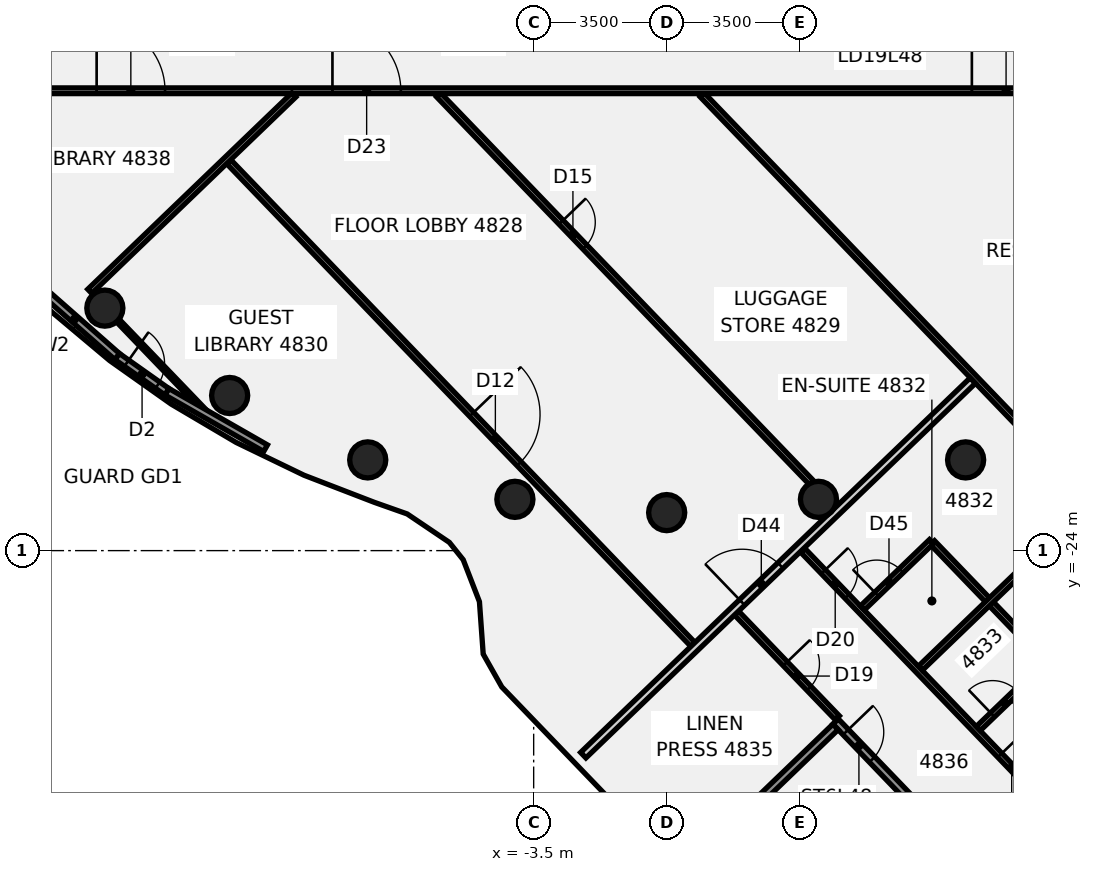
"""IFC4 building model, lengths in metres.
Left out: names, types, materials, properties, quantities, classifications, styles, units other than length and angle.
Written with IfcOpenShell. Run it as: python <this file> out.ifc"""

import sys

from ifc_helpers import new_model, si_unit, direction, frame, frame_2d, origin, origin_2d, place, context, subcontext, project, spatial, rectangle, circle, extrude, element, fill, save


model = new_model("IFC4")
c1 = context("Model", 3, precision=1e-05, world=origin(), true_north=direction((0.0, 1.0)))
c2 = subcontext(c1, "Body", "Model", "MODEL_VIEW")
j1 = project(units=[si_unit("LENGTHUNIT", "METRE"), si_unit("PLANEANGLEUNIT", "RADIAN")], contexts=[c1])
p1 = place(None, origin())
s1 = spatial("IfcSite", under=j1, at=p1, CompositionType="ELEMENT")
p2 = place(p1, origin())
s2 = spatial("IfcBuilding", under=s1, at=p2, CompositionType="ELEMENT")
p3 = place(p2, frame((0.0, 0.0, 193.3)))
s3 = spatial("IfcBuildingStorey", under=s2, at=p3, CompositionType="ELEMENT", Elevation=193.3)
for number, where, z_axis, x_axis in (
    (1, (-14.784, -17.619, -0.14), (0.0, 0.0, 1.0), (1.0, 0.0, 0.0)),
    (2, (-11.5, -19.919, -0.14), (0.0, 0.0, 1.0), (1.0, 0.0, 0.0)),
    (3, (-7.866, -21.613, -0.14), (0.0, 0.0, 1.0), (1.0, 0.0, 0.0)),
    (4, (-3.994, -22.651, -0.14), (0.0, 0.0, 1.0), (1.0, 0.0, 0.0)),
    (5, (0.0, -23.0, -0.14), (0.0, 0.0, 1.0), (1.0, 0.0, 0.0)),
    (6, (3.994, -22.651, -0.14), (0.0, 0.0, 1.0), (1.0, 0.0, 0.0)),
    (7, (7.866, -21.613, -0.14), (0.0, 0.0, 1.0), (1.0, 0.0, 0.0)),
):
    element("IfcColumn", number, at=place(p3, frame(where, z_axis=z_axis, x_axis=x_axis)), inside=s3, PredefinedType="COLUMN", context=c2, shape_type="SweptSolid", body=[
        extrude(circle(Radius=0.475, at=origin_2d()), origin(), (0.0, 0.0, 1.0), 3.6),
    ])
p4 = place(p3, frame((9.718, -24.17, -0.139), z_axis=(0.010573584179, 0.04927561345, 0.998729249215), x_axis=(-0.721101561283, -0.691569981719, 0.041755223636)))
e8 = element("IfcColumn", 8, at=p4, inside=s3, PredefinedType="COLUMN", context=c2, shape_type="SweptSolid", body=[
    extrude(rectangle(XDim=0.9, YDim=0.9, at=origin_2d()), origin(), (0.0, 0.0, 1.0), 3.602),
])
p5 = place(p3, frame((-14.446, -17.943, 0.0), z_axis=(0.0, 0.0, 1.0), x_axis=(0.693080436315, -0.720860256081, 0.0)))
e9 = element("IfcWall", 9, at=p5, inside=s3, PredefinedType="PARTITIONING", context=c2, shape_type="SweptSolid", body=[
    extrude(rectangle(XDim=3.278, YDim=0.1, at=frame_2d((1.639, 0.0))), origin(), (0.0, 0.0, 1.0), 2.864),
])
p6 = place(p3, frame((-11.522, -13.769, 0.0), z_axis=(0.0, 0.0, 1.0), x_axis=(0.693150251381, -0.720793124974, 0.0)))
e10 = element("IfcWall", 10, at=p6, inside=s3, PredefinedType="PARTITIONING", context=c2, shape_type="SweptSolid", body=[
    extrude(rectangle(XDim=17.62, YDim=0.15, at=frame_2d((8.81, 0.0))), origin(), (0.0, 0.0, 1.0), 2.864),
])
p7 = place(p6, frame((9.22, 0.0, 0.0)))
e11 = element("IfcOpeningElement", 11, at=p7, cuts=e10, PredefinedType="OPENING", context=c2, shape_type="SweptSolid", body=[
    extrude(rectangle(XDim=1.8, YDim=2.1, at=frame_2d((0.9, 1.05))), frame((0.0, 0.085, 0.0), z_axis=(0.0, -1.0, 0.0), x_axis=(1.0, 0.0, 0.0)), (0.0, 0.0, 1.0), 0.17),
])
p8 = place(p3, frame((-6.002, -12.008, 0.0), z_axis=(0.0, 0.0, 1.0), x_axis=(0.693152131844, -0.720791316624, 0.0)))
e12 = element("IfcWall", 12, at=p8, inside=s3, PredefinedType="PARTITIONING", context=c2, shape_type="SweptSolid", body=[
    extrude(rectangle(XDim=14.159, YDim=0.15, at=frame_2d((7.08, 0.0))), origin(), (0.0, 0.0, 1.0), 2.864),
])
p9 = place(p8, frame((4.65, 0.0, 0.0)))
e13 = element("IfcOpeningElement", 13, at=p9, cuts=e12, PredefinedType="OPENING", context=c2, shape_type="SweptSolid", body=[
    extrude(rectangle(XDim=0.9, YDim=2.1, at=frame_2d((0.45, 1.05))), frame((0.0, 0.085, 0.0), z_axis=(0.0, -1.0, 0.0), x_axis=(1.0, 0.0, 0.0)), (0.0, 0.0, 1.0), 0.17),
])
p10 = place(p3, frame((0.935, -12.008, 0.0), z_axis=(0.0, 0.0, 1.0), x_axis=(0.693163548461, -0.72078033761, 0.0)))
e14 = element("IfcWall", 14, at=p10, inside=s3, PredefinedType="PARTITIONING", context=c2, shape_type="SweptSolid", body=[
    extrude(rectangle(XDim=15.037, YDim=0.15, at=frame_2d((7.519, 0.0))), origin(), (0.0, 0.0, 1.0), 2.864),
])
p11 = place(p3, frame((1.838, -25.643, 0.0), z_axis=(0.0, 0.0, 1.0), x_axis=(0.693217139655, -0.720728795934, 0.0)))
e15 = element("IfcWall", 15, at=p11, inside=s3, PredefinedType="PARTITIONING", context=c2, shape_type="SweptSolid", body=[
    extrude(rectangle(XDim=3.825, YDim=0.15, at=frame_2d((1.912, 0.0))), origin(), (0.0, 0.0, 1.0), 2.864),
])
p12 = place(p11, frame((1.85, 0.0, 0.0)))
e16 = element("IfcOpeningElement", 16, at=p12, cuts=e15, PredefinedType="OPENING", context=c2, shape_type="SweptSolid", body=[
    extrude(rectangle(XDim=0.9, YDim=2.1, at=frame_2d((0.45, 1.05))), frame((0.0, 0.085, 0.0), z_axis=(0.0, -1.0, 0.0), x_axis=(1.0, 0.0, 0.0)), (0.0, 0.0, 1.0), 0.17),
])
p13 = place(p3, frame((3.582, -23.993, 0.0), z_axis=(0.0, 0.0, 1.0), x_axis=(0.6931498004, -0.72079355866, 0.0)))
e17 = element("IfcWall", 17, at=p13, inside=s3, PredefinedType="PARTITIONING", context=c2, shape_type="SweptSolid", body=[
    extrude(rectangle(XDim=13.301, YDim=0.15, at=frame_2d((6.65, 0.0))), origin(), (0.0, 0.0, 1.0), 2.864),
])
p14 = place(p13, frame((0.78, 0.0, 0.0)))
e18 = element("IfcOpeningElement", 18, at=p14, cuts=e17, PredefinedType="OPENING", context=c2, shape_type="SweptSolid", body=[
    extrude(rectangle(XDim=0.9, YDim=2.1, at=frame_2d((0.45, 1.05))), frame((0.0, 0.085, 0.0), z_axis=(0.0, -1.0, 0.0), x_axis=(1.0, 0.0, 0.0)), (0.0, 0.0, 1.0), 0.17),
])
p15 = place(p13, frame((7.48, 0.0, 0.0)))
e19 = element("IfcOpeningElement", 19, at=p15, cuts=e17, PredefinedType="OPENING", context=c2, shape_type="SweptSolid", body=[
    extrude(rectangle(XDim=0.9, YDim=2.1, at=frame_2d((0.45, 1.05))), frame((0.0, 0.085, 0.0), z_axis=(0.0, -1.0, 0.0), x_axis=(1.0, 0.0, 0.0)), (0.0, 0.0, 1.0), 0.17),
])
p16 = place(p13, frame((9.78, 0.0, 0.0)))
e20 = element("IfcOpeningElement", 20, at=p16, cuts=e17, PredefinedType="OPENING", context=c2, shape_type="SweptSolid", body=[
    extrude(rectangle(XDim=0.9, YDim=2.1, at=frame_2d((0.45, 1.05))), frame((0.0, 0.085, 0.0), z_axis=(0.0, -1.0, 0.0), x_axis=(1.0, 0.0, 0.0)), (0.0, 0.0, 1.0), 0.17),
])
p17 = place(p3, frame((6.995, -23.792, 0.0), z_axis=(0.0, 0.0, 1.0), x_axis=(0.693326664986, -0.72062343538, 0.0)))
e21 = element("IfcWall", 21, at=p17, inside=s3, PredefinedType="PARTITIONING", context=c2, shape_type="SweptSolid", body=[
    extrude(rectangle(XDim=4.32, YDim=0.15, at=frame_2d((2.16, 0.0))), origin(), (0.0, 0.0, 1.0), 2.864),
])
p18 = place(p3, frame((-17.1, -11.9, 0.0), z_axis=(0.0, 0.0, 1.0), x_axis=(1.0, 0.0, 0.0)))
e22 = element("IfcWall", 22, at=p18, inside=s3, PredefinedType="PARTITIONING", context=c2, shape_type="SweptSolid", body=[
    extrude(rectangle(XDim=34.165, YDim=0.15, at=frame_2d((17.083, 0.0))), origin(), (0.0, 0.0, 1.0), 2.864),
])
p19 = place(p18, frame((8.305, 0.0, 0.0)))
e23 = element("IfcOpeningElement", 23, at=p19, cuts=e22, PredefinedType="OPENING", context=c2, shape_type="SweptSolid", body=[
    extrude(rectangle(XDim=1.8, YDim=2.1, at=frame_2d((0.9, 1.05))), frame((0.0, 0.085, 0.0), z_axis=(0.0, -1.0, 0.0), x_axis=(1.0, 0.0, 0.0)), (0.0, 0.0, 1.0), 0.17),
])
p20 = place(p18, frame((2.1, 0.0, 0.0)))
e24 = element("IfcOpeningElement", 24, at=p20, cuts=e22, PredefinedType="OPENING", context=c2, shape_type="SweptSolid", body=[
    extrude(rectangle(XDim=1.8, YDim=2.1, at=frame_2d((0.9, 1.05))), frame((0.0, 0.085, 0.0), z_axis=(0.0, -1.0, 0.0), x_axis=(1.0, 0.0, 0.0)), (0.0, 0.0, 1.0), 0.17),
])
p21 = place(p18, frame((25.131, 0.0, 0.0)))
e25 = element("IfcOpeningElement", 25, at=p21, cuts=e22, PredefinedType="OPENING", context=c2, shape_type="SweptSolid", body=[
    extrude(rectangle(XDim=1.8, YDim=2.1, at=frame_2d((0.9, 1.05))), frame((0.0, 0.085, 0.0), z_axis=(0.0, -1.0, 0.0), x_axis=(1.0, 0.0, 0.0)), (0.0, 0.0, 1.0), 0.17),
])
p22 = place(p3, frame((-15.182, -17.177, 0.0), z_axis=(0.0, 0.0, 1.0), x_axis=(0.720763816656, 0.693180727227, 0.0)))
e26 = element("IfcWall", 26, at=p22, inside=s3, PredefinedType="PARTITIONING", context=c2, shape_type="SweptSolid", body=[
    extrude(rectangle(XDim=7.453, YDim=0.15, at=frame_2d((3.726, 0.0))), origin(), (0.0, 0.0, 1.0), 2.864),
])
p23 = place(p3, frame((-2.194, -29.383, 0.0), z_axis=(0.0, 0.0, 1.0), x_axis=(0.720785221716, 0.693158469728, 0.0)))
e27 = element("IfcWall", 27, at=p23, inside=s3, PredefinedType="PARTITIONING", context=c2, shape_type="SweptSolid", body=[
    extrude(rectangle(XDim=14.219, YDim=0.2, at=frame_2d((7.109, 0.0))), origin(), (0.0, 0.0, 1.0), 2.864),
])
p24 = place(p23, frame((5.799, 0.0, 0.0)))
e28 = element("IfcOpeningElement", 28, at=p24, cuts=e27, PredefinedType="OPENING", context=c2, shape_type="SweptSolid", body=[
    extrude(rectangle(XDim=1.4, YDim=2.1, at=frame_2d((0.7, 1.05))), frame((0.0, 0.11, 0.0), z_axis=(0.0, -1.0, 0.0), x_axis=(1.0, 0.0, 0.0)), (0.0, 0.0, 1.0), 0.22),
])
p25 = place(p3, frame((5.151, -25.51, 0.0), z_axis=(0.0, 0.0, 1.0), x_axis=(0.720825617884, 0.693116461067, 0.0)))
e29 = element("IfcWall", 29, at=p25, inside=s3, PredefinedType="PARTITIONING", context=c2, shape_type="SweptSolid", body=[
    extrude(rectangle(XDim=2.52, YDim=0.15, at=frame_2d((1.26, 0.0))), origin(), (0.0, 0.0, 1.0), 2.864),
])
p26 = place(p25, frame((0.52, 0.0, 0.0)))
e30 = element("IfcOpeningElement", 30, at=p26, cuts=e29, PredefinedType="OPENING", context=c2, shape_type="SweptSolid", body=[
    extrude(rectangle(XDim=0.9, YDim=2.1, at=frame_2d((0.45, 1.05))), frame((0.0, 0.085, 0.0), z_axis=(0.0, -1.0, 0.0), x_axis=(1.0, 0.0, 0.0)), (0.0, 0.0, 1.0), 0.17),
])
p27 = place(p3, frame((6.676, -27.095, 0.0), z_axis=(0.0, 0.0, 1.0), x_axis=(0.720624939565, 0.693325101577, 0.0)))
e31 = element("IfcWall", 31, at=p27, inside=s3, PredefinedType="PARTITIONING", context=c2, shape_type="SweptSolid", body=[
    extrude(rectangle(XDim=3.765, YDim=0.15, at=frame_2d((1.882, 0.0))), origin(), (0.0, 0.0, 1.0), 2.864),
])
p28 = place(p3, frame((8.201, -28.681, 0.0), z_axis=(0.0, 0.0, 1.0), x_axis=(0.720825617884, 0.693116461067, 0.0)))
e32 = element("IfcWall", 32, at=p28, inside=s3, PredefinedType="PARTITIONING", context=c2, shape_type="SweptSolid", body=[
    extrude(rectangle(XDim=2.52, YDim=0.15, at=frame_2d((1.26, 0.0))), origin(), (0.0, 0.0, 1.0), 2.864),
])
p29 = place(p28, frame((0.52, 0.0, 0.0)))
e33 = element("IfcOpeningElement", 33, at=p29, cuts=e32, PredefinedType="OPENING", context=c2, shape_type="SweptSolid", body=[
    extrude(rectangle(XDim=0.9, YDim=2.1, at=frame_2d((0.45, 1.05))), frame((0.0, 0.085, 0.0), z_axis=(0.0, -1.0, 0.0), x_axis=(1.0, 0.0, 0.0)), (0.0, 0.0, 1.0), 0.17),
])
p30 = place(p3, frame((-16.704, -16.919, 0.0), z_axis=(0.0, 0.0, 1.0), x_axis=(0.750789592243, -0.660541435627, 0.0)))
e34 = element("IfcWall", 34, at=p30, inside=s3, PredefinedType="SOLIDWALL", context=c2, shape_type="SweptSolid", body=[
    extrude(rectangle(XDim=2.992, YDim=0.2, at=frame_2d((1.496, 0.0))), origin(), (0.0, 0.0, 1.0), 3.46),
])
p31 = place(p3, frame((-13.151, -19.82, 0.0), z_axis=(0.0, 0.0, 1.0), x_axis=(0.867966774953, -0.496622268508, 0.0)))
e35 = element("IfcWall", 35, at=p31, inside=s3, PredefinedType="SOLIDWALL", context=c2, shape_type="SweptSolid", body=[
    extrude(rectangle(XDim=2.991, YDim=0.2, at=frame_2d((1.496, 0.0))), origin(), (0.0, 0.0, 1.0), 3.46),
])
p32 = place(p3, frame((-14.458, -18.896, 0.0), z_axis=(0.0, 0.0, 1.0), x_axis=(0.816354223939, -0.57755153974, 0.0)))
e36 = element("IfcWall", 36, at=p32, inside=s3, PredefinedType="SOLIDWALL", context=c2, shape_type="SweptSolid", body=[
    extrude(rectangle(XDim=1.6, YDim=0.2, at=frame_2d((0.8, 0.0))), origin(), (0.0, 0.0, 1.0), 3.46),
])
p33 = place(p32, frame((0.3, 0.0, 0.0)))
e37 = element("IfcOpeningElement", 37, at=p33, cuts=e36, PredefinedType="OPENING", context=c2, shape_type="SweptSolid", body=[
    extrude(rectangle(XDim=1.0, YDim=2.4, at=frame_2d((0.5, 1.2))), frame((0.0, 0.11, 0.0), z_axis=(0.0, -1.0, 0.0), x_axis=(1.0, 0.0, 0.0)), (0.0, 0.0, 1.0), 0.22),
])
p34 = place(p3, frame((4.445, -28.498, -0.14), z_axis=(0.0, 0.0, 1.0), x_axis=(0.693179705304, -0.72076479947, 0.0)))
e38 = element("IfcWall", 38, at=p34, inside=s3, PredefinedType="SHEAR", context=c2, shape_type="SweptSolid", body=[
    extrude(rectangle(XDim=6.735, YDim=0.2, at=frame_2d((3.368, 0.0))), origin(), (0.0, 0.0, 1.0), 3.004),
])
p35 = place(p34, frame((0.385, 0.0, 0.0)))
e39 = element("IfcOpeningElement", 39, at=p35, cuts=e38, PredefinedType="OPENING", context=c2, shape_type="SweptSolid", body=[
    extrude(rectangle(XDim=1.0, YDim=2.1, at=frame_2d((0.5, 1.05))), frame((0.0, 0.11, 0.0), z_axis=(0.0, -1.0, 0.0), x_axis=(1.0, 0.0, 0.0)), (0.0, 0.0, 1.0), 0.22),
])
p36 = place(p3, frame((1.985, -31.003, -0.14), z_axis=(0.0, 0.0, 1.0), x_axis=(0.720789040648, 0.693154498565, 0.0)))
e40 = element("IfcWall", 40, at=p36, inside=s3, PredefinedType="SHEAR", context=c2, shape_type="SweptSolid", body=[
    extrude(rectangle(XDim=3.41, YDim=0.2, at=frame_2d((1.705, 0.0))), origin(), (0.0, 0.0, 1.0), 3.004),
])
p37 = place(p7, frame((1.8, 0.0, 0.0), z_axis=(0.0, 0.0, 1.0), x_axis=(-1.0, 0.0, 0.0)))
e41 = element("IfcDoor", 41, at=p37, inside=s3, OperationType="DOUBLE_DOOR_SINGLE_SWING", PredefinedType="DOOR", context=c2, shape_type="SweptSolid", body=[
    extrude(rectangle(XDim=1.8, YDim=2.1, at=frame_2d((0.9, 1.05))), frame((0.0, 0.025, 0.0), z_axis=(0.0, -1.0, 0.0), x_axis=(1.0, 0.0, 0.0)), (0.0, 0.0, 1.0), 0.05),
])
fill(e11, e41)
p38 = place(p9, origin())
e42 = element("IfcDoor", 42, at=p38, inside=s3, OperationType="SINGLE_SWING_RIGHT", PredefinedType="DOOR", context=c2, shape_type="SweptSolid", body=[
    extrude(rectangle(XDim=0.9, YDim=2.1, at=frame_2d((0.45, 1.05))), frame((0.0, 0.025, 0.0), z_axis=(0.0, -1.0, 0.0), x_axis=(1.0, 0.0, 0.0)), (0.0, 0.0, 1.0), 0.05),
])
fill(e13, e42)
p39 = place(p12, frame((0.9, 0.0, 0.0), z_axis=(0.0, 0.0, 1.0), x_axis=(-1.0, 0.0, 0.0)))
e43 = element("IfcDoor", 43, at=p39, inside=s3, OperationType="SINGLE_SWING_RIGHT", PredefinedType="DOOR", context=c2, shape_type="SweptSolid", body=[
    extrude(rectangle(XDim=0.9, YDim=2.1, at=frame_2d((0.45, 1.05))), frame((0.0, 0.025, 0.0), z_axis=(0.0, -1.0, 0.0), x_axis=(1.0, 0.0, 0.0)), (0.0, 0.0, 1.0), 0.05),
])
fill(e16, e43)
p40 = place(p14, origin())
e44 = element("IfcDoor", 44, at=p40, inside=s3, OperationType="SINGLE_SWING_RIGHT", PredefinedType="DOOR", context=c2, shape_type="SweptSolid", body=[
    extrude(rectangle(XDim=0.9, YDim=2.1, at=frame_2d((0.45, 1.05))), frame((0.0, 0.025, 0.0), z_axis=(0.0, -1.0, 0.0), x_axis=(1.0, 0.0, 0.0)), (0.0, 0.0, 1.0), 0.05),
])
fill(e18, e44)
p41 = place(p15, origin())
e45 = element("IfcDoor", 45, at=p41, inside=s3, OperationType="SINGLE_SWING_LEFT", PredefinedType="DOOR", context=c2, shape_type="SweptSolid", body=[
    extrude(rectangle(XDim=0.9, YDim=2.1, at=frame_2d((0.45, 1.05))), frame((0.0, 0.025, 0.0), z_axis=(0.0, -1.0, 0.0), x_axis=(1.0, 0.0, 0.0)), (0.0, 0.0, 1.0), 0.05),
])
fill(e19, e45)
p42 = place(p19, origin())
e46 = element("IfcDoor", 46, at=p42, inside=s3, OperationType="DOUBLE_DOOR_SINGLE_SWING", PredefinedType="DOOR", context=c2, shape_type="SweptSolid", body=[
    extrude(rectangle(XDim=1.8, YDim=2.1, at=frame_2d((0.9, 1.05))), frame((0.0, 0.025, 0.0), z_axis=(0.0, -1.0, 0.0), x_axis=(1.0, 0.0, 0.0)), (0.0, 0.0, 1.0), 0.05),
])
fill(e23, e46)
p43 = place(p20, frame((1.8, 0.0, 0.0), z_axis=(0.0, 0.0, 1.0), x_axis=(-1.0, 0.0, 0.0)))
e47 = element("IfcDoor", 47, at=p43, inside=s3, OperationType="DOUBLE_DOOR_SINGLE_SWING", PredefinedType="DOOR", context=c2, shape_type="SweptSolid", body=[
    extrude(rectangle(XDim=1.8, YDim=2.1, at=frame_2d((0.9, 1.05))), frame((0.0, 0.025, 0.0), z_axis=(0.0, -1.0, 0.0), x_axis=(1.0, 0.0, 0.0)), (0.0, 0.0, 1.0), 0.05),
])
fill(e24, e47)
p44 = place(p21, origin())
e48 = element("IfcDoor", 48, at=p44, inside=s3, OperationType="DOUBLE_DOOR_SINGLE_SWING", PredefinedType="DOOR", context=c2, shape_type="SweptSolid", body=[
    extrude(rectangle(XDim=1.8, YDim=2.1, at=frame_2d((0.9, 1.05))), frame((0.0, 0.025, 0.0), z_axis=(0.0, -1.0, 0.0), x_axis=(1.0, 0.0, 0.0)), (0.0, 0.0, 1.0), 0.05),
])
fill(e25, e48)
p45 = place(p24, origin())
e49 = element("IfcDoor", 49, at=p45, inside=s3, OperationType="DOUBLE_DOOR_SINGLE_SWING", PredefinedType="DOOR", context=c2, shape_type="SweptSolid", body=[
    extrude(rectangle(XDim=1.4, YDim=2.1, at=frame_2d((0.7, 1.05))), frame((0.0, 0.025, 0.0), z_axis=(0.0, -1.0, 0.0), x_axis=(1.0, 0.0, 0.0)), (0.0, 0.0, 1.0), 0.05),
])
fill(e28, e49)
p46 = place(p26, frame((0.9, 0.0, 0.0), z_axis=(0.0, 0.0, 1.0), x_axis=(-1.0, 0.0, 0.0)))
e50 = element("IfcDoor", 50, at=p46, inside=s3, OperationType="SINGLE_SWING_LEFT", PredefinedType="DOOR", context=c2, shape_type="SweptSolid", body=[
    extrude(rectangle(XDim=0.9, YDim=2.1, at=frame_2d((0.45, 1.05))), frame((0.0, 0.025, 0.0), z_axis=(0.0, -1.0, 0.0), x_axis=(1.0, 0.0, 0.0)), (0.0, 0.0, 1.0), 0.05),
])
fill(e30, e50)
p47 = place(p29, origin())
e51 = element("IfcDoor", 51, at=p47, inside=s3, OperationType="SINGLE_SWING_RIGHT", PredefinedType="DOOR", context=c2, shape_type="SweptSolid", body=[
    extrude(rectangle(XDim=0.9, YDim=2.1, at=frame_2d((0.45, 1.05))), frame((0.0, 0.025, 0.0), z_axis=(0.0, -1.0, 0.0), x_axis=(1.0, 0.0, 0.0)), (0.0, 0.0, 1.0), 0.05),
])
fill(e33, e51)
p48 = place(p33, origin())
e52 = element("IfcDoor", 52, at=p48, inside=s3, OperationType="SINGLE_SWING_LEFT", PredefinedType="DOOR", context=c2, shape_type="SweptSolid", body=[
    extrude(rectangle(XDim=1.0, YDim=2.4, at=frame_2d((0.5, 1.2))), frame((0.0, 0.025, 0.0), z_axis=(0.0, -1.0, 0.0), x_axis=(1.0, 0.0, 0.0)), (0.0, 0.0, 1.0), 0.05),
])
fill(e37, e52)
p49 = place(p35, origin())
e53 = element("IfcDoor", 53, at=p49, inside=s3, OperationType="SINGLE_SWING_LEFT", PredefinedType="DOOR", context=c2, shape_type="SweptSolid", body=[
    extrude(rectangle(XDim=1.0, YDim=2.1, at=frame_2d((0.5, 1.05))), frame((0.0, 0.025, 0.0), z_axis=(0.0, -1.0, 0.0), x_axis=(1.0, 0.0, 0.0)), (0.0, 0.0, 1.0), 0.05),
])
fill(e39, e53)
save(model, sys.argv[1])
